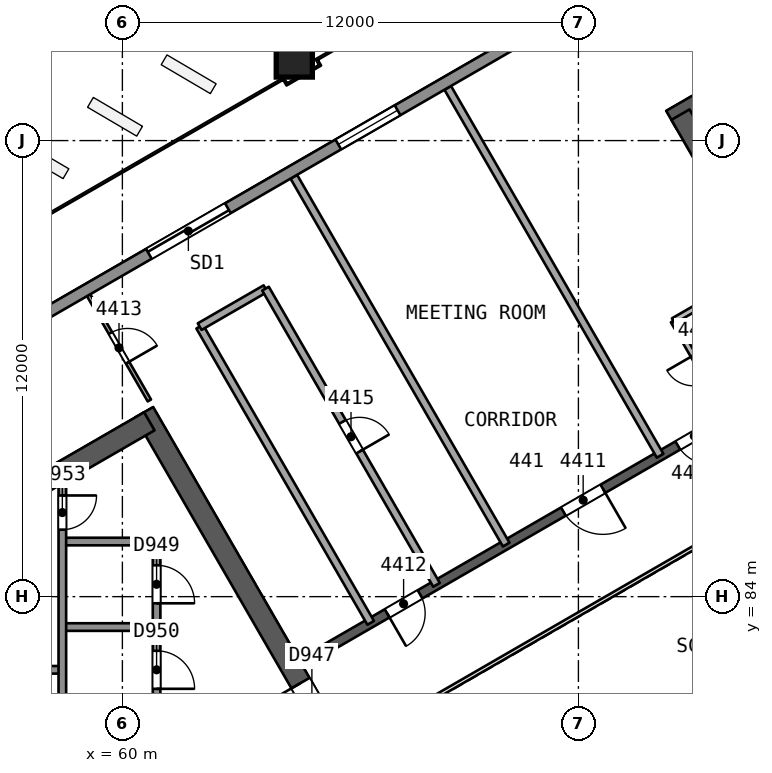
"""IFC4 building model, lengths in metres.
Left out: names, types, materials, properties, quantities, classifications, styles, units other than length and angle.
Written with IfcOpenShell. Run it as: python <this file> out.ifc"""

import sys

from ifc_helpers import new_model, si_unit, direction, frame, frame_2d, origin, origin_2d, place, context, subcontext, project, spatial, rectangle, extrude, element, fill, save


model = new_model("IFC4")
c1 = context("Model", 3, precision=1e-05, world=origin(), true_north=direction((0.0, 1.0)))
c2 = subcontext(c1, "Body", "Model", "MODEL_VIEW")
j1 = project(units=[si_unit("LENGTHUNIT", "METRE"), si_unit("PLANEANGLEUNIT", "RADIAN")], contexts=[c1])
p1 = place(None, origin())
s1 = spatial("IfcSite", under=j1, at=p1, CompositionType="ELEMENT")
p2 = place(p1, origin())
s2 = spatial("IfcBuilding", under=s1, at=p2, CompositionType="ELEMENT")
p3 = place(p2, frame((0.0, 0.0, 182.2)))
s3 = spatial("IfcBuildingStorey", under=s2, at=p3, CompositionType="ELEMENT", Elevation=182.2)
p4 = place(p3, frame((65.682, 80.0, 0.0), z_axis=(0.0, 0.0, 1.0), x_axis=(-0.500000202252, 0.866025287014, 0.0)))
e1 = element("IfcWall", 1, at=p4, inside=s3, PredefinedType="SHEAR", context=c2, shape_type="SweptSolid", body=[
    extrude(rectangle(XDim=10.221, YDim=0.55, at=frame_2d((5.111, 0.0))), origin(), (0.0, 0.0, 1.0), 3.7),
])
p5 = place(p4, frame((0.791, 0.0, 0.0)))
e2 = element("IfcOpeningElement", 2, at=p5, cuts=e1, PredefinedType="OPENING", context=c2, shape_type="SweptSolid", body=[
    extrude(rectangle(XDim=1.2, YDim=2.1, at=frame_2d((0.6, 1.05))), frame((0.0, 0.286, 0.0), z_axis=(0.0, -1.0, 0.0), x_axis=(1.0, 0.0, 0.0)), (0.0, 0.0, 1.0), 0.571),
])
p6 = place(p3, frame((60.709, 88.614, 0.0), z_axis=(0.0, 0.0, 1.0), x_axis=(-0.866020164116, -0.500009075263, 0.0)))
e3 = element("IfcWall", 3, at=p6, inside=s3, PredefinedType="SHEAR", context=c2, shape_type="SweptSolid", body=[
    extrude(rectangle(XDim=14.058, YDim=0.55, at=frame_2d((7.029, 0.0))), origin(), (0.0, 0.0, 1.0), 3.7),
])
p7 = place(p3, frame((86.723, 103.633, 0.0), z_axis=(0.0, 0.0, 1.0), x_axis=(-0.866023530946, -0.500003243837, 0.0)))
e4 = element("IfcWall", 4, at=p7, inside=s3, PredefinedType="SHEAR", context=c2, shape_type="SweptSolid", body=[
    extrude(rectangle(XDim=14.175, YDim=0.55, at=frame_2d((7.087, 0.0))), origin(), (0.0, 0.0, 1.0), 3.7),
])
p8 = place(p3, frame((74.686, 96.683, 0.0), z_axis=(0.0, 0.0, 1.0), x_axis=(0.499997818338, -0.866026663364, 0.0)))
e5 = element("IfcWall", 5, at=p8, inside=s3, PredefinedType="SHEAR", context=c2, shape_type="SweptSolid", body=[
    extrude(rectangle(XDim=10.105, YDim=0.55, at=frame_2d((5.052, 0.0))), origin(), (0.0, 0.0, 1.0), 3.7),
])
p9 = place(p8, frame((7.955, 0.0, 0.0)))
e6 = element("IfcOpeningElement", 6, at=p9, cuts=e5, PredefinedType="OPENING", context=c2, shape_type="SweptSolid", body=[
    extrude(rectangle(XDim=1.2, YDim=2.1, at=frame_2d((0.6, 1.05))), frame((0.0, 0.286, 0.0), z_axis=(0.0, -1.0, 0.0), x_axis=(1.0, 0.0, 0.0)), (0.0, 0.0, 1.0), 0.571),
])
p10 = place(p3, frame((78.2, 90.046, 0.0), z_axis=(0.0, 0.0, 1.0), x_axis=(-0.866026492143, -0.499998114903, 0.0)))
e7 = element("IfcWall", 7, at=p10, inside=s3, PredefinedType="SHEAR", context=c2, shape_type="SweptSolid", body=[
    extrude(rectangle(XDim=15.588, YDim=0.25, at=frame_2d((7.794, 0.0))), origin(), (0.0, 0.0, 1.0), 3.25),
])
p11 = place(p10, frame((3.138, 0.0, 0.0)))
e8 = element("IfcOpeningElement", 8, at=p11, cuts=e7, PredefinedType="OPENING", context=c2, shape_type="SweptSolid", body=[
    extrude(rectangle(XDim=1.0, YDim=2.1, at=frame_2d((0.5, 1.05))), frame((0.0, 0.135, 0.0), z_axis=(0.0, -1.0, 0.0), x_axis=(1.0, 0.0, 0.0)), (0.0, 0.0, 1.0), 0.271),
])
p12 = place(p10, frame((6.415, 0.0, 0.0)))
e9 = element("IfcOpeningElement", 9, at=p12, cuts=e7, PredefinedType="OPENING", context=c2, shape_type="SweptSolid", body=[
    extrude(rectangle(XDim=1.2, YDim=2.4, at=frame_2d((0.6, 1.2))), frame((0.0, 0.135, 0.0), z_axis=(0.0, -1.0, 0.0), x_axis=(1.0, 0.0, 0.0)), (0.0, 0.0, 1.0), 0.271),
])
p13 = place(p10, frame((11.971, 0.0, 0.0)))
e10 = element("IfcOpeningElement", 10, at=p13, cuts=e7, PredefinedType="OPENING", context=c2, shape_type="SweptSolid", body=[
    extrude(rectangle(XDim=1.0, YDim=2.1, at=frame_2d((0.5, 1.05))), frame((0.0, 0.135, 0.0), z_axis=(0.0, -1.0, 0.0), x_axis=(1.0, 0.0, 0.0)), (0.0, 0.0, 1.0), 0.271),
])
p14 = place(p3, frame((64.511, 98.167, 0.0), z_axis=(0.010093620709, -0.017482414954, 0.999796221231), x_axis=(0.866020200589, 0.50000901209, 8.5616e-08)))
e11 = element("IfcColumn", 11, at=p14, inside=s3, PredefinedType="COLUMN", context=c2, shape_type="SweptSolid", body=[
    extrude(rectangle(XDim=0.95, YDim=0.95, at=origin_2d()), origin(), (0.0, 0.0, 1.0), 3.701),
])
p15 = place(p3, frame((75.948, 88.746, 0.0), z_axis=(0.0, 0.0, 1.0), x_axis=(-0.499987231761, 0.866032775405, 0.0)))
e12 = element("IfcWall", 12, at=p15, inside=s3, PredefinedType="PARTITIONING", context=c2, shape_type="SweptSolid", body=[
    extrude(rectangle(XDim=2.9, YDim=0.15, at=frame_2d((1.45, 0.0))), origin(), (0.0, 0.0, 1.0), 3.25),
])
p16 = place(p15, frame((1.05, 0.0, 0.0)))
e13 = element("IfcOpeningElement", 13, at=p16, cuts=e12, PredefinedType="OPENING", context=c2, shape_type="SweptSolid", body=[
    extrude(rectangle(XDim=0.8, YDim=2.1, at=frame_2d((0.4, 1.05))), frame((0.0, 0.085, 0.0), z_axis=(0.0, -1.0, 0.0), x_axis=(1.0, 0.0, 0.0)), (0.0, 0.0, 1.0), 0.171),
])
p17 = place(p3, frame((74.498, 91.257, 0.0), z_axis=(0.0, 0.0, 1.0), x_axis=(0.866038271014, 0.499977712642, 0.0)))
e14 = element("IfcWall", 14, at=p17, inside=s3, PredefinedType="PARTITIONING", context=c2, shape_type="SweptSolid", body=[
    extrude(rectangle(XDim=2.401, YDim=0.15, at=frame_2d((1.2, 0.0))), origin(), (0.0, 0.0, 1.0), 3.25),
])
for number, where, z_axis, x_axis in (
    (15, (68.561, 97.388, 0.0), (0.0, 0.0, 1.0), (0.5, -0.866, 0.0)),
    (16, (64.511, 95.05, 0.0), (0.0, 0.0, 1.0), (0.5, -0.866, 0.0)),
):
    element("IfcWall", number, at=place(p3, frame(where, z_axis=z_axis, x_axis=x_axis)), inside=s3, PredefinedType="PARTITIONING", context=c2, shape_type="SweptSolid", body=[
        extrude(rectangle(XDim=11.178, YDim=0.2, at=frame_2d((5.589, 0.0))), origin(), (0.0, 0.0, 1.0), 3.25),
    ])
p18 = place(p3, frame((59.111, 91.932, 0.0), z_axis=(0.0, 0.0, 1.0), x_axis=(0.499980071345, -0.866036909293, 0.0)))
e17 = element("IfcWall", 17, at=p18, inside=s3, PredefinedType="PARTITIONING", context=c2, shape_type="SweptSolid", body=[
    extrude(rectangle(XDim=3.199, YDim=0.1, at=frame_2d((1.6, 0.0))), origin(), (0.0, 0.0, 1.0), 3.25),
])
p19 = place(p18, frame((1.15, 0.0, 0.0)))
e18 = element("IfcOpeningElement", 18, at=p19, cuts=e17, PredefinedType="OPENING", context=c2, shape_type="SweptSolid", body=[
    extrude(rectangle(XDim=0.9, YDim=2.1, at=frame_2d((0.45, 1.05))), frame((0.0, 0.061, 0.0), z_axis=(0.0, -1.0, 0.0), x_axis=(1.0, 0.0, 0.0)), (0.0, 0.0, 1.0), 0.121),
])
p20 = place(p3, frame((66.534, 83.311, 0.0), z_axis=(0.0, 0.0, 1.0), x_axis=(-0.5000018851, 0.866024315419, 0.0)))
e19 = element("IfcWall", 19, at=p20, inside=s3, PredefinedType="PARTITIONING", context=c2, shape_type="SweptSolid", body=[
    extrude(rectangle(XDim=9.0, YDim=0.2, at=frame_2d((4.5, 0.0))), origin(), (0.0, 0.0, 1.0), 3.25),
])
p21 = place(p3, frame((62.034, 91.105, 0.0), z_axis=(0.0, 0.0, 1.0), x_axis=(0.866041268327, 0.499972520799, 0.0)))
e20 = element("IfcWall", 20, at=p21, inside=s3, PredefinedType="PARTITIONING", context=c2, shape_type="SweptSolid", body=[
    extrude(rectangle(XDim=2.0, YDim=0.2, at=frame_2d((1.0, 0.0))), origin(), (0.0, 0.0, 1.0), 3.25),
])
p22 = place(p3, frame((63.766, 92.105, 0.0), z_axis=(0.0, 0.0, 1.0), x_axis=(0.5000018851, -0.866024315419, 0.0)))
e21 = element("IfcWall", 21, at=p22, inside=s3, PredefinedType="PARTITIONING", context=c2, shape_type="SweptSolid", body=[
    extrude(rectangle(XDim=9.0, YDim=0.2, at=frame_2d((4.5, 0.0))), origin(), (0.0, 0.0, 1.0), 3.25),
])
p23 = place(p22, frame((4.05, 0.0, 0.0)))
e22 = element("IfcOpeningElement", 22, at=p23, cuts=e21, PredefinedType="OPENING", context=c2, shape_type="SweptSolid", body=[
    extrude(rectangle(XDim=0.9, YDim=2.1, at=frame_2d((0.45, 1.05))), frame((0.0, 0.11, 0.0), z_axis=(0.0, -1.0, 0.0), x_axis=(1.0, 0.0, 0.0)), (0.0, 0.0, 1.0), 0.221),
])
p24 = place(p3, frame((42.841, 82.711, 0.0), z_axis=(0.0, 0.0, 1.0), x_axis=(0.866024774967, 0.500001089142, 0.0)))
e23 = element("IfcWall", 23, at=p24, inside=s3, PredefinedType="SOLIDWALL", context=c2, shape_type="SweptSolid", body=[
    extrude(rectangle(XDim=52.991, YDim=0.3, at=frame_2d((26.496, 0.0))), origin(), (0.0, 0.0, 1.0), 3.25),
])
p25 = place(p24, frame((20.619, 0.0, 0.0)))
e24 = element("IfcOpeningElement", 24, at=p25, cuts=e23, PredefinedType="OPENING", context=c2, shape_type="SweptSolid", body=[
    extrude(rectangle(XDim=2.4, YDim=2.4, at=frame_2d((1.2, 1.2))), frame((0.0, 0.161, 0.0), z_axis=(0.0, -1.0, 0.0), x_axis=(1.0, 0.0, 0.0)), (0.0, 0.0, 1.0), 0.321),
])
p26 = place(p24, frame((9.392, 0.0, 0.0)))
e25 = element("IfcOpeningElement", 25, at=p26, cuts=e23, PredefinedType="OPENING", context=c2, shape_type="SweptSolid", body=[
    extrude(rectangle(XDim=2.4, YDim=2.4, at=frame_2d((1.2, 1.2))), frame((0.0, 0.161, 0.0), z_axis=(0.0, -1.0, 0.0), x_axis=(1.0, 0.0, 0.0)), (0.0, 0.0, 1.0), 0.321),
])
p27 = place(p24, frame((40.145, 0.0, 0.0)))
e26 = element("IfcOpeningElement", 26, at=p27, cuts=e23, PredefinedType="OPENING", context=c2, shape_type="SweptSolid", body=[
    extrude(rectangle(XDim=2.4, YDim=2.4, at=frame_2d((1.2, 1.2))), frame((0.0, 0.161, 0.0), z_axis=(0.0, -1.0, 0.0), x_axis=(1.0, 0.0, 0.0)), (0.0, 0.0, 1.0), 0.321),
])
p28 = place(p24, frame((26.375, 0.0, 0.9)))
e27 = element("IfcOpeningElement", 27, at=p28, cuts=e23, PredefinedType="OPENING", context=c2, shape_type="SweptSolid", body=[
    extrude(rectangle(XDim=1.8, YDim=1.5, at=frame_2d((0.9, 0.75))), frame((0.0, 0.161, 0.0), z_axis=(0.0, -1.0, 0.0), x_axis=(1.0, 0.0, 0.0)), (0.0, 0.0, 1.0), 0.321),
])
for number, where, z_axis, x_axis in (
    (28, (60.9, 85.45, 0.0), (0.0, 0.0, 1.0), (-1.0, 0.0, 0.0)),
    (29, (60.9, 83.2, 0.0), (0.0, 0.0, 1.0), (-1.0, 0.0, 0.0)),
):
    element("IfcWall", number, at=place(p3, frame(where, z_axis=z_axis, x_axis=x_axis)), inside=s3, PredefinedType="SOLIDWALL", context=c2, shape_type="SweptSolid", body=[
        extrude(rectangle(XDim=2.48, YDim=0.2, at=frame_2d((1.24, 0.0))), origin(), (0.0, 0.0, 1.0), 3.25),
    ])
p29 = place(p3, frame((58.42, 82.075, 0.0), z_axis=(0.0, 0.0, 1.0), x_axis=(-1.0, 0.0, 0.0)))
e30 = element("IfcWall", 30, at=p29, inside=s3, PredefinedType="SOLIDWALL", context=c2, shape_type="SweptSolid", body=[
    extrude(rectangle(XDim=7.7, YDim=0.2, at=frame_2d((3.85, 0.0))), origin(), (0.0, 0.0, 1.0), 3.25),
])
p30 = place(p3, frame((60.9, 85.45, 0.0), z_axis=(0.0, 0.0, 1.0), x_axis=(0.0, -1.0, 0.0)))
e31 = element("IfcWall", 31, at=p30, inside=s3, PredefinedType="SOLIDWALL", context=c2, shape_type="SweptSolid", body=[
    extrude(rectangle(XDim=10.9, YDim=0.2, at=frame_2d((5.45, 0.0))), origin(), (0.0, 0.0, 1.0), 3.25),
])
p31 = place(p30, frame((0.625, 0.0, 0.0)))
e32 = element("IfcOpeningElement", 32, at=p31, cuts=e31, PredefinedType="OPENING", context=c2, shape_type="SweptSolid", body=[
    extrude(rectangle(XDim=1.0, YDim=2.1, at=frame_2d((0.5, 1.05))), frame((0.0, 0.11, 0.0), z_axis=(0.0, -1.0, 0.0), x_axis=(1.0, 0.0, 0.0)), (0.0, 0.0, 1.0), 0.221),
])
p32 = place(p30, frame((2.875, 0.0, 0.0)))
e33 = element("IfcOpeningElement", 33, at=p32, cuts=e31, PredefinedType="OPENING", context=c2, shape_type="SweptSolid", body=[
    extrude(rectangle(XDim=1.0, YDim=2.1, at=frame_2d((0.5, 1.05))), frame((0.0, 0.11, 0.0), z_axis=(0.0, -1.0, 0.0), x_axis=(1.0, 0.0, 0.0)), (0.0, 0.0, 1.0), 0.221),
])
p33 = place(p30, frame((6.25, 0.0, 0.0)))
e34 = element("IfcOpeningElement", 34, at=p33, cuts=e31, PredefinedType="OPENING", context=c2, shape_type="SweptSolid", body=[
    extrude(rectangle(XDim=1.0, YDim=2.1, at=frame_2d((0.5, 1.05))), frame((0.0, 0.11, 0.0), z_axis=(0.0, -1.0, 0.0), x_axis=(1.0, 0.0, 0.0)), (0.0, 0.0, 1.0), 0.221),
])
p34 = place(p3, frame((58.42, 86.974, 0.0), z_axis=(0.0, 0.0, 1.0), x_axis=(0.0, -1.0, 0.0)))
e35 = element("IfcWall", 35, at=p34, inside=s3, PredefinedType="SOLIDWALL", context=c2, shape_type="SweptSolid", body=[
    extrude(rectangle(XDim=10.524, YDim=0.2, at=frame_2d((5.262, 0.0))), origin(), (0.0, 0.0, 1.0), 3.25),
])
p35 = place(p34, frame((0.312, 0.0, 0.0)))
e36 = element("IfcOpeningElement", 36, at=p35, cuts=e35, PredefinedType="OPENING", context=c2, shape_type="SweptSolid", body=[
    extrude(rectangle(XDim=0.9, YDim=2.1, at=frame_2d((0.45, 1.05))), frame((0.0, 0.11, 0.0), z_axis=(0.0, -1.0, 0.0), x_axis=(1.0, 0.0, 0.0)), (0.0, 0.0, 1.0), 0.221),
])
p36 = place(p3, frame((77.738, 86.846, 0.0), z_axis=(0.0, 0.0, 1.0), x_axis=(-0.866026658274, -0.499997827154, 0.0)))
e37 = element("IfcWall", 37, at=p36, inside=s3, PredefinedType="PARTITIONING", context=c2, shape_type="SweptSolid", body=[
    extrude(rectangle(XDim=11.588, YDim=0.1, at=frame_2d((5.794, 0.0))), origin(), (0.0, 0.0, 1.0), 3.25),
])
p37 = place(p11, origin())
e38 = element("IfcDoor", 38, at=p37, inside=s3, OperationType="SINGLE_SWING_LEFT", PredefinedType="NOTDEFINED", context=c2, shape_type="SweptSolid", body=[
    extrude(rectangle(XDim=1.0, YDim=2.1, at=frame_2d((0.5, 1.05))), frame((0.0, 0.025, 0.0), z_axis=(0.0, -1.0, 0.0), x_axis=(1.0, 0.0, 0.0)), (0.0, 0.0, 1.0), 0.05),
])
fill(e8, e38)
p38 = place(p12, origin())
e39 = element("IfcDoor", 39, at=p38, inside=s3, OperationType="SINGLE_SWING_LEFT", PredefinedType="NOTDEFINED", context=c2, shape_type="SweptSolid", body=[
    extrude(rectangle(XDim=1.2, YDim=2.4, at=frame_2d((0.6, 1.2))), frame((0.0, 0.025, 0.0), z_axis=(0.0, -1.0, 0.0), x_axis=(1.0, 0.0, 0.0)), (0.0, 0.0, 1.0), 0.05),
])
fill(e9, e39)
p39 = place(p13, origin())
e40 = element("IfcDoor", 40, at=p39, inside=s3, OperationType="SINGLE_SWING_RIGHT", PredefinedType="NOTDEFINED", context=c2, shape_type="SweptSolid", body=[
    extrude(rectangle(XDim=1.0, YDim=2.1, at=frame_2d((0.5, 1.05))), frame((0.0, 0.025, 0.0), z_axis=(0.0, -1.0, 0.0), x_axis=(1.0, 0.0, 0.0)), (0.0, 0.0, 1.0), 0.05),
])
fill(e10, e40)
p40 = place(p19, origin())
e41 = element("IfcDoor", 41, at=p40, inside=s3, OperationType="SINGLE_SWING_RIGHT", PredefinedType="NOTDEFINED", context=c2, shape_type="SweptSolid", body=[
    extrude(rectangle(XDim=0.9, YDim=2.1, at=frame_2d((0.45, 1.05))), frame((0.0, 0.025, 0.0), z_axis=(0.0, -1.0, 0.0), x_axis=(1.0, 0.0, 0.0)), (0.0, 0.0, 1.0), 0.05),
])
fill(e18, e41)
p41 = place(p23, origin())
e42 = element("IfcDoor", 42, at=p41, inside=s3, OperationType="SINGLE_SWING_RIGHT", PredefinedType="NOTDEFINED", context=c2, shape_type="SweptSolid", body=[
    extrude(rectangle(XDim=0.9, YDim=2.1, at=frame_2d((0.45, 1.05))), frame((0.0, 0.025, 0.0), z_axis=(0.0, -1.0, 0.0), x_axis=(1.0, 0.0, 0.0)), (0.0, 0.0, 1.0), 0.05),
])
fill(e22, e42)
p42 = place(p25, origin())
e43 = element("IfcDoor", 43, at=p42, inside=s3, OperationType="SLIDING_TO_LEFT", PredefinedType="NOTDEFINED", context=c2, shape_type="SweptSolid", body=[
    extrude(rectangle(XDim=2.4, YDim=2.4, at=frame_2d((1.2, 1.2))), frame((0.0, 0.025, 0.0), z_axis=(0.0, -1.0, 0.0), x_axis=(1.0, 0.0, 0.0)), (0.0, 0.0, 1.0), 0.05),
])
fill(e24, e43)
p43 = place(p28, origin())
e44 = element("IfcWindow", 44, at=p43, inside=s3, PartitioningType="SINGLE_PANEL", PredefinedType="WINDOW", context=c2, shape_type="SweptSolid", body=[
    extrude(rectangle(XDim=1.8, YDim=1.5, at=frame_2d((0.9, 0.75))), frame((0.0, 0.03, 0.0), z_axis=(0.0, -1.0, 0.0), x_axis=(1.0, 0.0, 0.0)), (0.0, 0.0, 1.0), 0.06),
])
fill(e27, e44)
p44 = place(p5, origin())
e45 = element("IfcDoor", 45, at=p44, inside=s3, OperationType="SINGLE_SWING_RIGHT", PredefinedType="NOTDEFINED", context=c2, shape_type="SweptSolid", body=[
    extrude(rectangle(XDim=1.2, YDim=2.1, at=frame_2d((0.6, 1.05))), frame((0.0, 0.025, 0.0), z_axis=(0.0, -1.0, 0.0), x_axis=(1.0, 0.0, 0.0)), (0.0, 0.0, 1.0), 0.05),
])
fill(e2, e45)
p45 = place(p31, origin())
e46 = element("IfcDoor", 46, at=p45, inside=s3, OperationType="SINGLE_SWING_RIGHT", PredefinedType="NOTDEFINED", context=c2, shape_type="SweptSolid", body=[
    extrude(rectangle(XDim=1.0, YDim=2.1, at=frame_2d((0.5, 1.05))), frame((0.0, 0.025, 0.0), z_axis=(0.0, -1.0, 0.0), x_axis=(1.0, 0.0, 0.0)), (0.0, 0.0, 1.0), 0.05),
])
fill(e32, e46)
p46 = place(p32, origin())
e47 = element("IfcDoor", 47, at=p46, inside=s3, OperationType="SINGLE_SWING_RIGHT", PredefinedType="NOTDEFINED", context=c2, shape_type="SweptSolid", body=[
    extrude(rectangle(XDim=1.0, YDim=2.1, at=frame_2d((0.5, 1.05))), frame((0.0, 0.025, 0.0), z_axis=(0.0, -1.0, 0.0), x_axis=(1.0, 0.0, 0.0)), (0.0, 0.0, 1.0), 0.05),
])
fill(e33, e47)
p47 = place(p35, origin())
e48 = element("IfcDoor", 48, at=p47, inside=s3, OperationType="SINGLE_SWING_LEFT", PredefinedType="NOTDEFINED", context=c2, shape_type="SweptSolid", body=[
    extrude(rectangle(XDim=0.9, YDim=2.1, at=frame_2d((0.45, 1.05))), frame((0.0, 0.025, 0.0), z_axis=(0.0, -1.0, 0.0), x_axis=(1.0, 0.0, 0.0)), (0.0, 0.0, 1.0), 0.05),
])
fill(e36, e48)
save(model, sys.argv[1])
